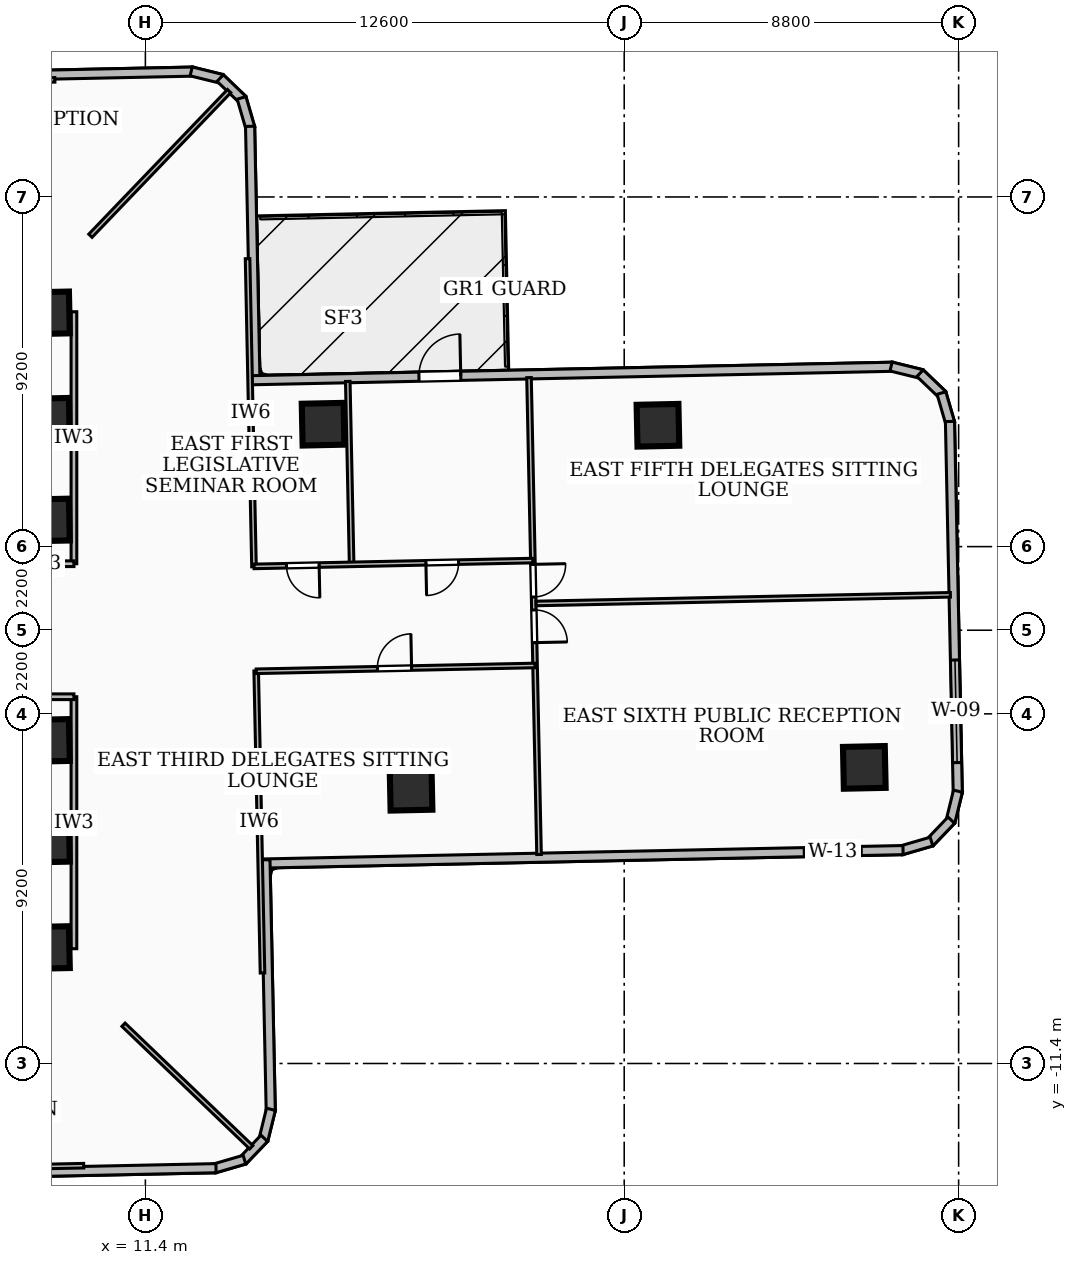
"""IFC4 building model, lengths in metres.
Left out: names, types, materials, properties, quantities, classifications, styles, units other than length and angle.
Written with IfcOpenShell. Run it as: python <this file> out.ifc"""

import sys

from ifc_helpers import new_model, si_unit, direction, frame, frame_2d, origin, origin_2d, place, context, subcontext, project, spatial, rectangle, extrude, element, fill, save


model = new_model("IFC4")
c1 = context("Model", 3, precision=1e-05, world=origin(), true_north=direction((0.0, 1.0)))
c2 = subcontext(c1, "Body", "Model", "MODEL_VIEW")
j1 = project(units=[si_unit("LENGTHUNIT", "METRE"), si_unit("PLANEANGLEUNIT", "RADIAN")], contexts=[c1])
p1 = place(None, origin())
s1 = spatial("IfcSite", under=j1, at=p1, CompositionType="ELEMENT")
p2 = place(p1, origin())
s2 = spatial("IfcBuilding", under=s1, at=p2, CompositionType="ELEMENT")
p3 = place(p2, frame((0.0, 0.0, 38.88)))
s3 = spatial("IfcBuildingStorey", under=s2, at=p3, CompositionType="ELEMENT", Elevation=38.88)
for number, where, z_axis, x_axis in (
    (1, (8.85, -5.55, 0.0), (0.0, 0.0, 1.0), (1.0, 0.021, 0.0)),
    (2, (8.85, -2.9, 0.0), (0.0, 0.0, 1.0), (1.0, 0.021, 0.0)),
    (3, (8.85, 2.9, 0.0), (0.0, 0.0, 1.0), (1.0, 0.021, 0.0)),
    (4, (8.85, 5.55, 0.0), (0.0, 0.0, 1.0), (1.0, 0.021, 0.0)),
    (5, (8.85, -8.35, 0.0), (0.0, 0.0, 1.0), (1.0, 0.021, 0.0)),
    (6, (8.85, 8.35, 0.0), (0.0, 0.0, 1.0), (1.0, 0.021, 0.0)),
    (7, (18.391, -4.184, 0.0), (0.0, 0.0, 1.0), (1.0, 0.021, 0.0)),
    (8, (16.076, 5.421, 0.0), (0.0, 0.0, 1.0), (1.0, 0.021, 0.0)),
    (9, (30.318, -3.609, 0.0), (0.0, 0.0, 1.0), (1.0, 0.021, 0.0)),
    (10, (24.888, 5.393, 0.0), (0.0, 0.0, 1.0), (1.0, 0.021, 0.0)),
):
    element("IfcColumn", number, at=place(p3, frame(where, z_axis=z_axis, x_axis=x_axis)), inside=s3, PredefinedType="COLUMN", context=c2, shape_type="SweptSolid", body=[
        extrude(rectangle(XDim=1.1, YDim=1.1, at=origin_2d()), origin(), (0.0, 0.0, 1.0), 3.6),
    ])
p4 = place(p3, frame((6.041, 14.559, 0.0), z_axis=(0.0, 0.0, 1.0), x_axis=(0.999776327957, 0.021149327571, 0.0)))
e11 = element("IfcWall", 11, at=p4, inside=s3, PredefinedType="SOLIDWALL", context=c2, shape_type="SweptSolid", body=[
    extrude(rectangle(XDim=6.615, YDim=0.24, at=frame_2d((3.307, 0.0))), origin(), (0.0, 0.0, 1.0), 2.421),
])
p5 = place(p3, frame((12.605, 14.704, 0.0), z_axis=(0.0, 0.0, 1.0), x_axis=(0.971120878097, -0.238588013371, 0.0)))
e12 = element("IfcWall", 12, at=p5, inside=s3, PredefinedType="SOLIDWALL", context=c2, shape_type="SweptSolid", body=[
    extrude(rectangle(XDim=0.83, YDim=0.24, at=frame_2d((0.415, 0.0))), origin(), (0.0, 0.0, 1.0), 3.34),
])
p6 = place(p3, frame((13.369, 14.529, 0.0), z_axis=(0.0, 0.0, 1.0), x_axis=(0.721807017337, -0.692094379202, 0.0)))
e13 = element("IfcWall", 13, at=p6, inside=s3, PredefinedType="SOLIDWALL", context=c2, shape_type="SweptSolid", body=[
    extrude(rectangle(XDim=0.813, YDim=0.24, at=frame_2d((0.407, 0.0))), origin(), (0.0, 0.0, 1.0), 3.34),
])
p7 = place(p3, frame((13.931, 14.007, 0.0), z_axis=(0.0, 0.0, 1.0), x_axis=(0.279649933772, -0.960102033401, 0.0)))
e14 = element("IfcWall", 14, at=p7, inside=s3, PredefinedType="SOLIDWALL", context=c2, shape_type="SweptSolid", body=[
    extrude(rectangle(XDim=0.83, YDim=0.24, at=frame_2d((0.415, 0.0))), origin(), (0.0, 0.0, 1.0), 3.34),
])
p8 = place(p3, frame((14.155, 13.259, 0.0), z_axis=(0.0, 0.0, 1.0), x_axis=(0.021111649844, -0.999777124284, 0.0)))
e15 = element("IfcWall", 15, at=p8, inside=s3, PredefinedType="SOLIDWALL", context=c2, shape_type="SweptSolid", body=[
    extrude(rectangle(XDim=6.777, YDim=0.24, at=frame_2d((3.388, 0.0))), origin(), (0.0, 0.0, 1.0), 3.34),
])
p9 = place(p3, frame((14.2, 6.578, 0.0), z_axis=(0.0, 0.0, 1.0), x_axis=(0.999778412505, 0.021050555542, 0.0)))
e16 = element("IfcWall", 16, at=p9, inside=s3, PredefinedType="SOLIDWALL", context=c2, shape_type="SweptSolid", body=[
    extrude(rectangle(XDim=16.875, YDim=0.24, at=frame_2d((8.438, 0.0))), origin(), (0.0, 0.0, 1.0), 3.34),
])
p10 = place(p9, frame((4.4, 0.0, 0.0)))
e17 = element("IfcOpeningElement", 17, at=p10, cuts=e16, PredefinedType="OPENING", context=c2, shape_type="SweptSolid", body=[
    extrude(rectangle(XDim=1.1, YDim=2.1, at=frame_2d((0.55, 1.05))), frame((0.0, 0.13, 0.0), z_axis=(0.0, -1.0, 0.0), x_axis=(1.0, 0.0, 0.0)), (0.0, 0.0, 1.0), 0.26),
])
p11 = place(p3, frame((31.022, 6.938, 0.0), z_axis=(0.0, 0.0, 1.0), x_axis=(0.971120878097, -0.238588013371, 0.0)))
e18 = element("IfcWall", 18, at=p11, inside=s3, PredefinedType="SOLIDWALL", context=c2, shape_type="SweptSolid", body=[
    extrude(rectangle(XDim=0.83, YDim=0.24, at=frame_2d((0.415, 0.0))), origin(), (0.0, 0.0, 1.0), 3.34),
])
p12 = place(p3, frame((31.786, 6.763, 0.0), z_axis=(0.0, 0.0, 1.0), x_axis=(0.721807017337, -0.692094379202, 0.0)))
e19 = element("IfcWall", 19, at=p12, inside=s3, PredefinedType="SOLIDWALL", context=c2, shape_type="SweptSolid", body=[
    extrude(rectangle(XDim=0.813, YDim=0.24, at=frame_2d((0.407, 0.0))), origin(), (0.0, 0.0, 1.0), 3.34),
])
p13 = place(p3, frame((32.348, 6.241, 0.0), z_axis=(0.0, 0.0, 1.0), x_axis=(0.2797289077, -0.960079027058, 0.0)))
e20 = element("IfcWall", 20, at=p13, inside=s3, PredefinedType="SOLIDWALL", context=c2, shape_type="SweptSolid", body=[
    extrude(rectangle(XDim=0.83, YDim=0.24, at=frame_2d((0.415, 0.0))), origin(), (0.0, 0.0, 1.0), 3.34),
])
p14 = place(p3, frame((32.572, 5.493, 0.0), z_axis=(0.0, 0.0, 1.0), x_axis=(0.020971264701, -0.999780078846, 0.0)))
e21 = element("IfcWall", 21, at=p14, inside=s3, PredefinedType="SOLIDWALL", context=c2, shape_type="SweptSolid", body=[
    extrude(rectangle(XDim=9.779, YDim=0.24, at=frame_2d((4.89, 0.0))), origin(), (0.0, 0.0, 1.0), 3.34),
])
p15 = place(p14, frame((6.278, 0.0, 0.85)))
e22 = element("IfcOpeningElement", 22, at=p15, cuts=e21, PredefinedType="OPENING", context=c2, shape_type="SweptSolid", body=[
    extrude(rectangle(XDim=2.7, YDim=1.65, at=frame_2d((1.35, 0.825))), frame((0.0, 0.13, 0.0), z_axis=(0.0, -1.0, 0.0), x_axis=(1.0, 0.0, 0.0)), (0.0, 0.0, 1.0), 0.26),
])
p16 = place(p3, frame((32.782, -4.235, 0.0), z_axis=(0.0, 0.0, 1.0), x_axis=(-0.238860968489, -0.971053776952, 0.0)))
e23 = element("IfcWall", 23, at=p16, inside=s3, PredefinedType="SOLIDWALL", context=c2, shape_type="SweptSolid", body=[
    extrude(rectangle(XDim=0.829, YDim=0.24, at=frame_2d((0.415, 0.0))), origin(), (0.0, 0.0, 1.0), 3.34),
])
p17 = place(p3, frame((32.607, -4.998, 0.0), z_axis=(0.0, 0.0, 1.0), x_axis=(-0.691018151037, -0.722837405602, 0.0)))
e24 = element("IfcWall", 24, at=p17, inside=s3, PredefinedType="SOLIDWALL", context=c2, shape_type="SweptSolid", body=[
    extrude(rectangle(XDim=0.813, YDim=0.24, at=frame_2d((0.407, 0.0))), origin(), (0.0, 0.0, 1.0), 3.34),
])
p18 = place(p3, frame((32.086, -5.561, 0.0), z_axis=(0.0, 0.0, 1.0), x_axis=(-0.960249728562, -0.279142362954, 0.0)))
e25 = element("IfcWall", 25, at=p18, inside=s3, PredefinedType="SOLIDWALL", context=c2, shape_type="SweptSolid", body=[
    extrude(rectangle(XDim=0.831, YDim=0.24, at=frame_2d((0.416, 0.0))), origin(), (0.0, 0.0, 1.0), 3.34),
])
p19 = place(p3, frame((31.337, -5.785, 0.0), z_axis=(0.0, 0.0, 1.0), x_axis=(-0.999779951425, -0.020977338469, 0.0)))
e26 = element("IfcWall", 26, at=p19, inside=s3, PredefinedType="SOLIDWALL", context=c2, shape_type="SweptSolid", body=[
    extrude(rectangle(XDim=16.875, YDim=0.24, at=frame_2d((8.438, 0.0))), origin(), (0.0, 0.0, 1.0), 3.34),
])
p20 = place(p19, frame((1.1, 0.0, 0.85)))
e27 = element("IfcOpeningElement", 27, at=p20, cuts=e26, PredefinedType="OPENING", context=c2, shape_type="SweptSolid", body=[
    extrude(rectangle(XDim=1.5, YDim=1.8, at=frame_2d((0.75, 0.9))), frame((0.0, 0.13, 0.0), z_axis=(0.0, -1.0, 0.0), x_axis=(1.0, 0.0, 0.0)), (0.0, 0.0, 1.0), 0.26),
])
p21 = place(p3, frame((14.559, -6.041, 0.0), z_axis=(0.0, 0.0, 1.0), x_axis=(0.021149327571, -0.999776327957, 0.0)))
e28 = element("IfcWall", 28, at=p21, inside=s3, PredefinedType="SOLIDWALL", context=c2, shape_type="SweptSolid", body=[
    extrude(rectangle(XDim=6.615, YDim=0.24, at=frame_2d((3.307, 0.0))), origin(), (0.0, 0.0, 1.0), 3.34),
])
p22 = place(p3, frame((14.704, -12.605, 0.0), z_axis=(0.0, 0.0, 1.0), x_axis=(-0.238588013371, -0.971120878097, 0.0)))
e29 = element("IfcWall", 29, at=p22, inside=s3, PredefinedType="SOLIDWALL", context=c2, shape_type="SweptSolid", body=[
    extrude(rectangle(XDim=0.83, YDim=0.24, at=frame_2d((0.415, 0.0))), origin(), (0.0, 0.0, 1.0), 3.34),
])
p23 = place(p3, frame((14.529, -13.369, 0.0), z_axis=(0.0, 0.0, 1.0), x_axis=(-0.692094379202, -0.721807017337, 0.0)))
e30 = element("IfcWall", 30, at=p23, inside=s3, PredefinedType="SOLIDWALL", context=c2, shape_type="SweptSolid", body=[
    extrude(rectangle(XDim=0.813, YDim=0.24, at=frame_2d((0.407, 0.0))), origin(), (0.0, 0.0, 1.0), 3.34),
])
p24 = place(p3, frame((14.007, -13.931, 0.0), z_axis=(0.0, 0.0, 1.0), x_axis=(-0.960102033401, -0.279649933772, 0.0)))
e31 = element("IfcWall", 31, at=p24, inside=s3, PredefinedType="SOLIDWALL", context=c2, shape_type="SweptSolid", body=[
    extrude(rectangle(XDim=0.83, YDim=0.24, at=frame_2d((0.415, 0.0))), origin(), (0.0, 0.0, 1.0), 3.34),
])
p25 = place(p3, frame((13.259, -14.155, 0.0), z_axis=(0.0, 0.0, 1.0), x_axis=(-0.999777124284, -0.021111649844, 0.0)))
e32 = element("IfcWall", 32, at=p25, inside=s3, PredefinedType="SOLIDWALL", context=c2, shape_type="SweptSolid", body=[
    extrude(rectangle(XDim=6.777, YDim=0.24, at=frame_2d((3.388, 0.0))), origin(), (0.0, 0.0, 1.0), 3.34),
])
p26 = place(p3, frame((9.52, 1.75, 0.0), z_axis=(0.0, 0.0, 1.0), x_axis=(0.0, 1.0, 0.0)))
e33 = element("IfcWall", 33, at=p26, inside=s3, PredefinedType="PARTITIONING", context=c2, shape_type="SweptSolid", body=[
    extrude(rectangle(XDim=6.63, YDim=0.15, at=frame_2d((3.315, 0.0))), origin(), (0.0, 0.0, 1.0), 2.421),
])
p27 = place(p3, frame((7.85, 1.75, 0.0), z_axis=(0.0, 0.0, 1.0), x_axis=(1.0, 0.0, 0.0)))
e34 = element("IfcWall", 34, at=p27, inside=s3, PredefinedType="PARTITIONING", context=c2, shape_type="SweptSolid", body=[
    extrude(rectangle(XDim=1.67, YDim=0.15, at=frame_2d((0.835, 0.0))), origin(), (0.0, 0.0, 1.0), 2.405),
])
p28 = place(p3, frame((9.52, -8.38, 0.0), z_axis=(0.0, 0.0, 1.0), x_axis=(0.0, 1.0, 0.0)))
e35 = element("IfcWall", 35, at=p28, inside=s3, PredefinedType="PARTITIONING", context=c2, shape_type="SweptSolid", body=[
    extrude(rectangle(XDim=6.63, YDim=0.15, at=frame_2d((3.315, 0.0))), origin(), (0.0, 0.0, 1.0), 2.421),
])
p29 = place(p3, frame((7.85, -1.75, 0.0), z_axis=(0.0, 0.0, 1.0), x_axis=(1.0, 0.0, 0.0)))
e36 = element("IfcWall", 36, at=p29, inside=s3, PredefinedType="PARTITIONING", context=c2, shape_type="SweptSolid", body=[
    extrude(rectangle(XDim=1.67, YDim=0.15, at=frame_2d((0.835, 0.0))), origin(), (0.0, 0.0, 1.0), 2.405),
])
p30 = place(p3, frame((9.954, 10.38, 0.0), z_axis=(0.0, 0.0, 1.0), x_axis=(0.692136602063, 0.721766530178, 0.0)))
e37 = element("IfcWall", 37, at=p30, inside=s3, PredefinedType="PARTITIONING", context=c2, shape_type="SweptSolid", body=[
    extrude(rectangle(XDim=5.273, YDim=0.12, at=frame_2d((2.637, 0.0))), origin(), (0.0, 0.0, 1.0), 3.34),
])
p31 = place(p3, frame((10.824, -10.38, 0.0), z_axis=(0.0, 0.0, 1.0), x_axis=(0.721757981693, -0.692145516392, 0.0)))
e38 = element("IfcWall", 38, at=p31, inside=s3, PredefinedType="PARTITIONING", context=c2, shape_type="SweptSolid", body=[
    extrude(rectangle(XDim=4.658, YDim=0.12, at=frame_2d((2.329, 0.0))), origin(), (0.0, 0.0, 1.0), 3.34),
])
p32 = place(p3, frame((14.258, 1.669, 0.0), z_axis=(0.0, 0.0, 1.0), x_axis=(-0.020831948152, 0.999782991422, 0.0)))
e39 = element("IfcWall", 39, at=p32, inside=s3, PredefinedType="PARTITIONING", context=c2, shape_type="SweptSolid", body=[
    extrude(rectangle(XDim=8.11, YDim=0.12, at=frame_2d((4.055, 0.0))), origin(), (0.0, 0.0, 1.0), 2.421),
])
p33 = place(p3, frame((14.482, -9.018, 0.0), z_axis=(0.0, 0.0, 1.0), x_axis=(-0.020883173321, 0.999781922757, 0.0)))
e40 = element("IfcWall", 40, at=p33, inside=s3, PredefinedType="PARTITIONING", context=c2, shape_type="SweptSolid", body=[
    extrude(rectangle(XDim=7.95, YDim=0.12, at=frame_2d((3.975, 0.0))), origin(), (0.0, 0.0, 1.0), 2.421),
])
p34 = place(p3, frame((16.827, 1.753, 0.0), z_axis=(0.0, 0.0, 1.0), x_axis=(-0.021027075848, 0.999778906599, 0.0)))
e41 = element("IfcWall", 41, at=p34, inside=s3, PredefinedType="PARTITIONING", context=c2, shape_type="SweptSolid", body=[
    extrude(rectangle(XDim=4.795, YDim=0.12, at=frame_2d((2.397, 0.0))), origin(), (0.0, 0.0, 1.0), 2.421),
])
p35 = place(p3, frame((21.596, 1.833, 0.0), z_axis=(0.0, 0.0, 1.0), x_axis=(-0.999779695776, -0.020989519165, 0.0)))
e42 = element("IfcWall", 42, at=p35, inside=s3, PredefinedType="PARTITIONING", context=c2, shape_type="SweptSolid", body=[
    extrude(rectangle(XDim=7.34, YDim=0.12, at=frame_2d((3.67, 0.0))), origin(), (0.0, 0.0, 1.0), 2.869),
])
p36 = place(p35, frame((5.625, 0.0, 0.0)))
e43 = element("IfcOpeningElement", 43, at=p36, cuts=e42, PredefinedType="OPENING", context=c2, shape_type="SweptSolid", body=[
    extrude(rectangle(XDim=0.86, YDim=2.04, at=frame_2d((0.43, 1.02))), frame((0.0, 0.07, 0.0), z_axis=(0.0, -1.0, 0.0), x_axis=(1.0, 0.0, 0.0)), (0.0, 0.0, 1.0), 0.14),
])
p37 = place(p35, frame((1.955, 0.0, 0.0)))
e44 = element("IfcOpeningElement", 44, at=p37, cuts=e42, PredefinedType="OPENING", context=c2, shape_type="SweptSolid", body=[
    extrude(rectangle(XDim=0.86, YDim=2.04, at=frame_2d((0.43, 1.02))), frame((0.0, 0.07, 0.0), z_axis=(0.0, -1.0, 0.0), x_axis=(1.0, 0.0, 0.0)), (0.0, 0.0, 1.0), 0.14),
])
p38 = place(p3, frame((14.316, -1.08, 0.0), z_axis=(0.0, 0.0, 1.0), x_axis=(0.999782493564, 0.020855828042, 0.0)))
e45 = element("IfcWall", 45, at=p38, inside=s3, PredefinedType="PARTITIONING", context=c2, shape_type="SweptSolid", body=[
    extrude(rectangle(XDim=7.34, YDim=0.12, at=frame_2d((3.67, 0.0))), origin(), (0.0, 0.0, 1.0), 2.869),
])
p39 = place(p38, frame((3.19, 0.0, 0.0)))
e46 = element("IfcOpeningElement", 46, at=p39, cuts=e45, PredefinedType="OPENING", context=c2, shape_type="SweptSolid", body=[
    extrude(rectangle(XDim=0.9, YDim=2.06, at=frame_2d((0.45, 1.03))), frame((0.0, 0.07, 0.0), z_axis=(0.0, -1.0, 0.0), x_axis=(1.0, 0.0, 0.0)), (0.0, 0.0, 1.0), 0.14),
])
p40 = place(p3, frame((21.68, 0.704, 0.0), z_axis=(0.0, 0.0, 1.0), x_axis=(0.999781840983, 0.02088708788, 0.0)))
e47 = element("IfcWall", 47, at=p40, inside=s3, PredefinedType="PARTITIONING", context=c2, shape_type="SweptSolid", body=[
    extrude(rectangle(XDim=10.906, YDim=0.12, at=frame_2d((5.453, 0.0))), origin(), (0.0, 0.0, 1.0), 2.72),
])
p41 = place(p3, frame((21.495, 6.647, 0.0), z_axis=(0.0, 0.0, 1.0), x_axis=(0.021028114531, -0.999778884754, 0.0)))
e48 = element("IfcWall", 48, at=p41, inside=s3, PredefinedType="PARTITIONING", context=c2, shape_type="SweptSolid", body=[
    extrude(rectangle(XDim=12.551, YDim=0.12, at=frame_2d((6.275, 0.0))), origin(), (0.0, 0.0, 1.0), 2.421),
])
p42 = place(p41, frame((6.115, 0.0, 0.0)))
e49 = element("IfcOpeningElement", 49, at=p42, cuts=e48, PredefinedType="OPENING", context=c2, shape_type="SweptSolid", body=[
    extrude(rectangle(XDim=0.86, YDim=2.04, at=frame_2d((0.43, 1.02))), frame((0.0, 0.07, 0.0), z_axis=(0.0, -1.0, 0.0), x_axis=(1.0, 0.0, 0.0)), (0.0, 0.0, 1.0), 0.14),
])
p43 = place(p41, frame((4.915, 0.0, 0.0)))
e50 = element("IfcOpeningElement", 50, at=p43, cuts=e48, PredefinedType="OPENING", context=c2, shape_type="SweptSolid", body=[
    extrude(rectangle(XDim=0.86, YDim=2.04, at=frame_2d((0.43, 1.02))), frame((0.0, 0.07, 0.0), z_axis=(0.0, -1.0, 0.0), x_axis=(1.0, 0.0, 0.0)), (0.0, 0.0, 1.0), 0.14),
])
p44 = place(p3, frame((9.018, 14.482, 0.0), z_axis=(0.0, 0.0, 1.0), x_axis=(-0.999781922757, -0.020883173321, 0.0)))
e51 = element("IfcWall", 51, at=p44, inside=s3, PredefinedType="PARTITIONING", context=c2, shape_type="SweptSolid", body=[
    extrude(rectangle(XDim=7.95, YDim=0.12, at=frame_2d((3.975, 0.0))), origin(), (0.0, 0.0, 1.0), 2.421),
])
p45 = place(p3, frame((1.669, -14.258, 0.0), z_axis=(0.0, 0.0, 1.0), x_axis=(0.999782991422, 0.020831948152, 0.0)))
e52 = element("IfcWall", 52, at=p45, inside=s3, PredefinedType="PARTITIONING", context=c2, shape_type="SweptSolid", body=[
    extrude(rectangle(XDim=8.11, YDim=0.12, at=frame_2d((4.055, 0.0))), origin(), (0.0, 0.0, 1.0), 2.421),
])
p46 = place(p10, origin())
e53 = element("IfcDoor", 53, at=p46, inside=s3, OperationType="SINGLE_SWING_RIGHT", PredefinedType="DOOR", context=c2, shape_type="SweptSolid", body=[
    extrude(rectangle(XDim=1.1, YDim=2.1, at=frame_2d((0.55, 1.05))), frame((0.0, 0.025, 0.0), z_axis=(0.0, -1.0, 0.0), x_axis=(1.0, 0.0, 0.0)), (0.0, 0.0, 1.0), 0.05),
])
fill(e17, e53)
p47 = place(p15, origin())
e54 = element("IfcWindow", 54, at=p47, inside=s3, PartitioningType="SINGLE_PANEL", PredefinedType="WINDOW", context=c2, shape_type="SweptSolid", body=[
    extrude(rectangle(XDim=2.7, YDim=1.65, at=frame_2d((1.35, 0.825))), frame((0.0, 0.03, 0.0), z_axis=(0.0, -1.0, 0.0), x_axis=(1.0, 0.0, 0.0)), (0.0, 0.0, 1.0), 0.06),
])
fill(e22, e54)
p48 = place(p20, origin())
e55 = element("IfcWindow", 55, at=p48, inside=s3, PartitioningType="SINGLE_PANEL", PredefinedType="WINDOW", context=c2, shape_type="SweptSolid", body=[
    extrude(rectangle(XDim=1.5, YDim=1.8, at=frame_2d((0.75, 0.9))), frame((0.0, 0.03, 0.0), z_axis=(0.0, -1.0, 0.0), x_axis=(1.0, 0.0, 0.0)), (0.0, 0.0, 1.0), 0.06),
])
fill(e27, e55)
p49 = place(p36, origin())
e56 = element("IfcDoor", 56, at=p49, inside=s3, OperationType="SINGLE_SWING_LEFT", PredefinedType="DOOR", context=c2, shape_type="SweptSolid", body=[
    extrude(rectangle(XDim=0.86, YDim=2.04, at=frame_2d((0.43, 1.02))), frame((0.0, 0.025, 0.0), z_axis=(0.0, -1.0, 0.0), x_axis=(1.0, 0.0, 0.0)), (0.0, 0.0, 1.0), 0.05),
])
fill(e43, e56)
p50 = place(p37, origin())
e57 = element("IfcDoor", 57, at=p50, inside=s3, OperationType="SINGLE_SWING_RIGHT", PredefinedType="DOOR", context=c2, shape_type="SweptSolid", body=[
    extrude(rectangle(XDim=0.86, YDim=2.04, at=frame_2d((0.43, 1.02))), frame((0.0, 0.025, 0.0), z_axis=(0.0, -1.0, 0.0), x_axis=(1.0, 0.0, 0.0)), (0.0, 0.0, 1.0), 0.05),
])
fill(e44, e57)
p51 = place(p39, origin())
e58 = element("IfcDoor", 58, at=p51, inside=s3, OperationType="SINGLE_SWING_RIGHT", PredefinedType="DOOR", context=c2, shape_type="SweptSolid", body=[
    extrude(rectangle(XDim=0.9, YDim=2.06, at=frame_2d((0.45, 1.03))), frame((0.0, 0.025, 0.0), z_axis=(0.0, -1.0, 0.0), x_axis=(1.0, 0.0, 0.0)), (0.0, 0.0, 1.0), 0.05),
])
fill(e46, e58)
p52 = place(p42, origin())
e59 = element("IfcDoor", 59, at=p52, inside=s3, OperationType="SINGLE_SWING_RIGHT", PredefinedType="DOOR", context=c2, shape_type="SweptSolid", body=[
    extrude(rectangle(XDim=0.86, YDim=2.04, at=frame_2d((0.43, 1.02))), frame((0.0, 0.025, 0.0), z_axis=(0.0, -1.0, 0.0), x_axis=(1.0, 0.0, 0.0)), (0.0, 0.0, 1.0), 0.05),
])
fill(e49, e59)
p53 = place(p43, origin())
e60 = element("IfcDoor", 60, at=p53, inside=s3, OperationType="SINGLE_SWING_LEFT", PredefinedType="DOOR", context=c2, shape_type="SweptSolid", body=[
    extrude(rectangle(XDim=0.86, YDim=2.04, at=frame_2d((0.43, 1.02))), frame((0.0, 0.025, 0.0), z_axis=(0.0, -1.0, 0.0), x_axis=(1.0, 0.0, 0.0)), (0.0, 0.0, 1.0), 0.05),
])
fill(e50, e60)
save(model, sys.argv[1])
